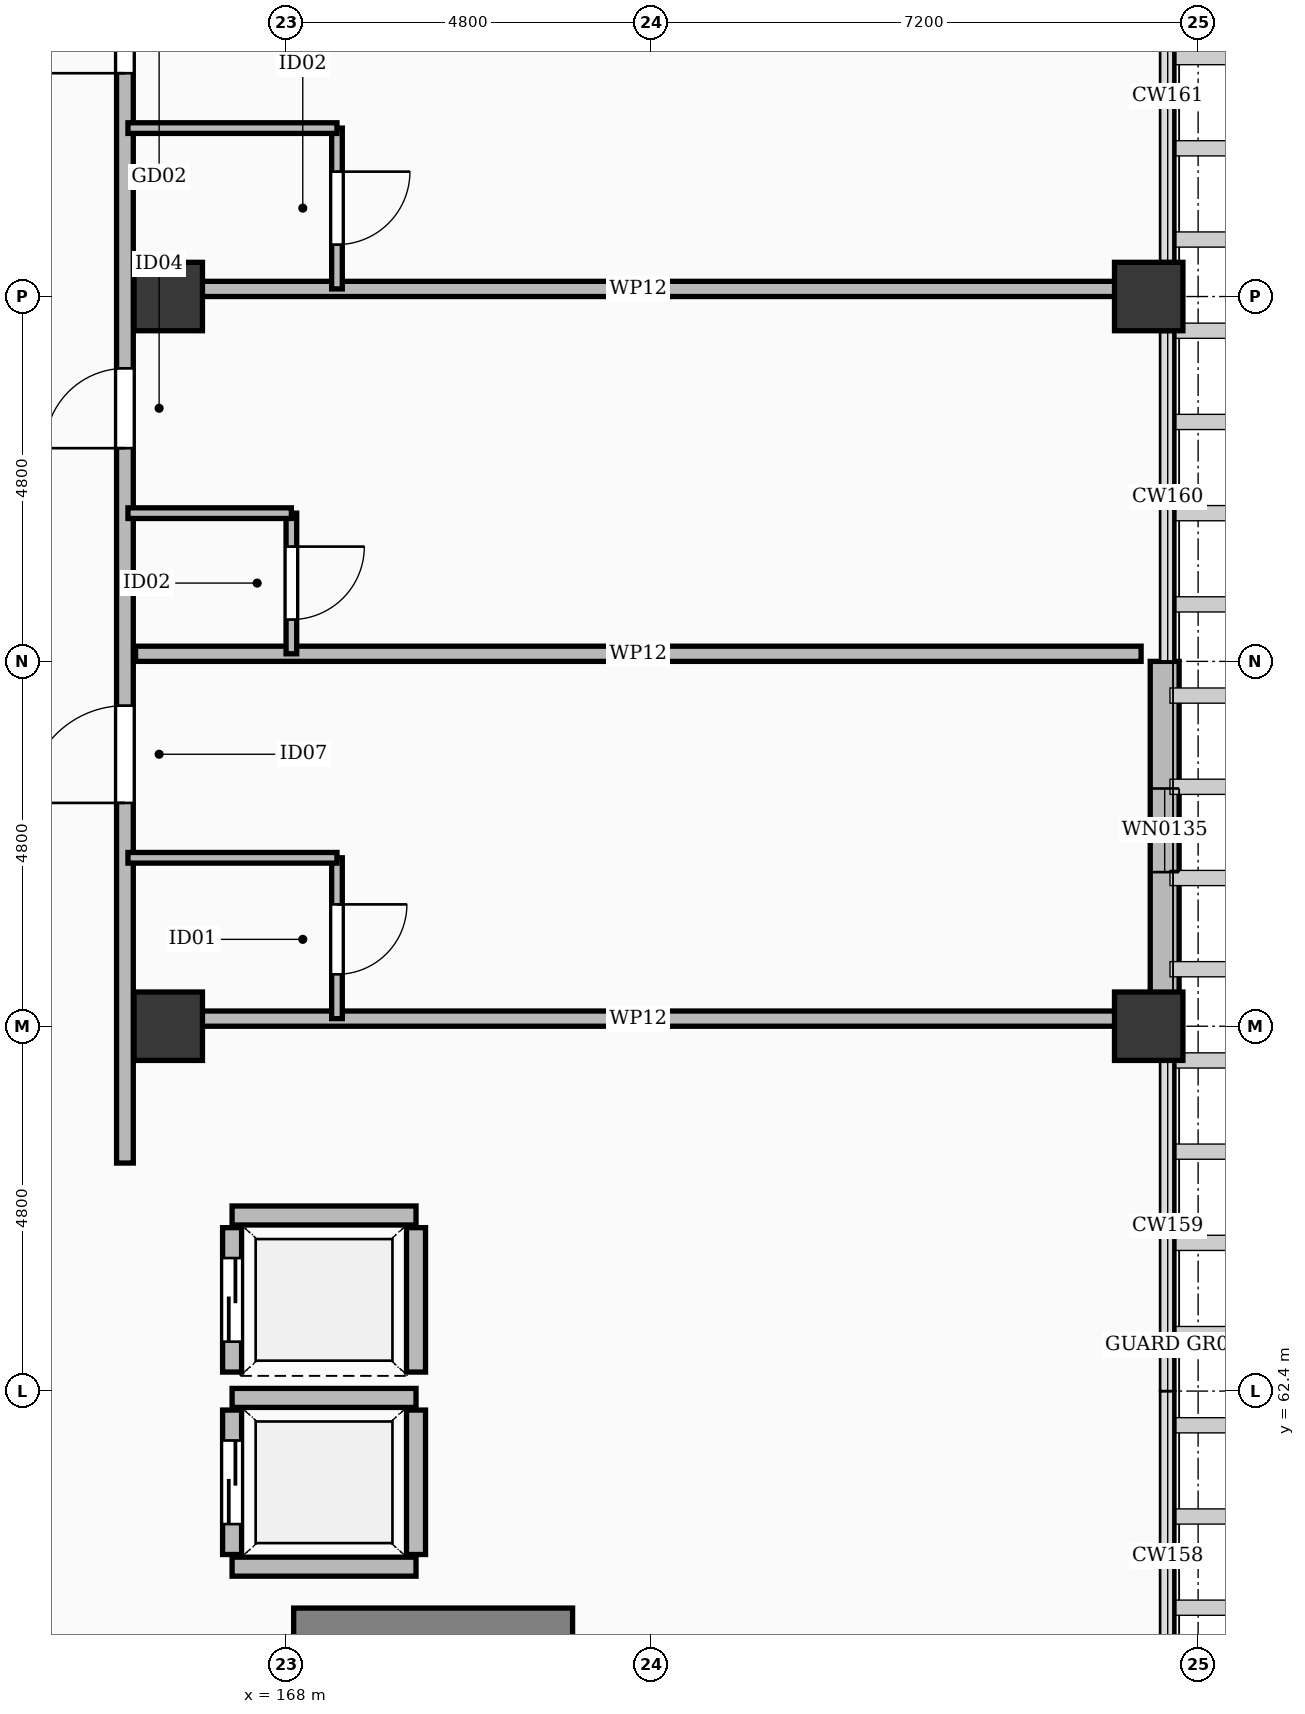
"""IFC4 building model, lengths in metres.
Left out: names, types, materials, properties, quantities, classifications, styles, units other than length and angle.
Written with IfcOpenShell. Run it as: python <this file> out.ifc"""

import sys

from ifc_helpers import new_model, si_unit, direction, frame, frame_2d, origin, origin_2d, place, context, subcontext, project, spatial, rectangle, extrude, element, fill, save


model = new_model("IFC4")
c1 = context("Model", 3, precision=1e-05, world=origin(), true_north=direction((0.0, 1.0)))
c2 = subcontext(c1, "Body", "Model", "MODEL_VIEW")
j1 = project(units=[si_unit("LENGTHUNIT", "METRE"), si_unit("PLANEANGLEUNIT", "RADIAN")], contexts=[c1])
p1 = place(None, origin())
s1 = spatial("IfcSite", under=j1, at=p1, CompositionType="ELEMENT")
p2 = place(p1, origin())
s2 = spatial("IfcBuilding", under=s1, at=p2, CompositionType="ELEMENT")
p3 = place(p2, frame((0.0, 0.0, 16.2)))
s3 = spatial("IfcBuildingStorey", under=s2, at=p3, CompositionType="ELEMENT", Elevation=16.2)
for number, where, z_axis, x_axis in (
    (1, (166.45, 67.2, 0.0), (0.0, 0.0, 1.0), (1.0, 0.0, 0.0)),
    (2, (166.45, 76.8, 0.0), (0.0, 0.0, 1.0), (1.0, 0.0, 0.0)),
    (3, (179.35, 67.2, 0.0), (0.0, 0.0, 1.0), (1.0, 0.0, 0.0)),
    (4, (179.35, 76.8, 0.0), (0.0, 0.0, 1.0), (1.0, 0.0, 0.0)),
):
    element("IfcColumn", number, at=place(p3, frame(where, z_axis=z_axis, x_axis=x_axis)), inside=s3, PredefinedType="COLUMN", context=c2, shape_type="SweptSolid", body=[
        extrude(rectangle(XDim=0.9, YDim=0.9, at=origin_2d()), origin(), (0.0, 0.0, 1.0), 4.8),
    ])
p4 = place(p3, frame((179.56, 72.0, 0.0), z_axis=(0.0, 0.0, 1.0), x_axis=(0.0, -1.0, 0.0)))
e5 = element("IfcWall", 5, at=p4, inside=s3, PredefinedType="SOLIDWALL", context=c2, shape_type="SweptSolid", body=[
    extrude(rectangle(XDim=4.375, YDim=0.38, at=frame_2d((2.188, 0.0))), origin(), (0.0, 0.0, 1.0), 3.032),
])
p5 = place(p4, frame((1.673, 0.0, 0.55)))
e6 = element("IfcOpeningElement", 6, at=p5, cuts=e5, PredefinedType="OPENING", context=c2, shape_type="SweptSolid", body=[
    extrude(rectangle(XDim=1.1, YDim=1.7, at=frame_2d((0.55, 0.85))), frame((0.0, 0.202, 0.0), z_axis=(0.0, -1.0, 0.0), x_axis=(1.0, 0.0, 0.0)), (0.0, 0.0, 1.0), 0.404),
])
p6 = place(p3, frame((168.1, 59.32, 0.0), z_axis=(0.0, 0.0, 1.0), x_axis=(1.0, 0.0, 0.0)))
e7 = element("IfcWall", 7, at=p6, inside=s3, PredefinedType="SHEAR", context=c2, shape_type="SweptSolid", body=[
    extrude(rectangle(XDim=3.67, YDim=0.45, at=frame_2d((1.835, 0.0))), origin(), (0.0, 0.0, 1.0), 4.54),
])
for number, where, z_axis, x_axis in (
    (8, (167.29, 60.09, 0.0), (0.0, 0.0, 1.0), (1.0, 0.0, 0.0)),
    (9, (167.29, 62.31, 0.0), (0.0, 0.0, 1.0), (1.0, 0.0, 0.0)),
):
    element("IfcWall", number, at=place(p3, frame(where, z_axis=z_axis, x_axis=x_axis)), inside=s3, PredefinedType="SOLIDWALL", context=c2, shape_type="SweptSolid", body=[
        extrude(rectangle(XDim=2.42, YDim=0.25, at=frame_2d((1.21, 0.0))), origin(), (0.0, 0.0, 1.0), 4.54),
    ])
p7 = place(p3, frame((167.29, 60.25, 0.0), z_axis=(0.0, 0.0, 1.0), x_axis=(0.0, 1.0, 0.0)))
e10 = element("IfcWall", 10, at=p7, inside=s3, PredefinedType="SOLIDWALL", context=c2, shape_type="SweptSolid", body=[
    extrude(rectangle(XDim=1.9, YDim=0.25, at=frame_2d((0.95, 0.0))), origin(), (0.0, 0.0, 1.0), 4.54),
])
p8 = place(p7, frame((0.4, 0.0, 0.0)))
e11 = element("IfcOpeningElement", 11, at=p8, cuts=e10, PredefinedType="OPENING", context=c2, shape_type="SweptSolid", body=[
    extrude(rectangle(XDim=1.1, YDim=2.2, at=frame_2d((0.55, 1.1))), frame((0.0, 0.137, 0.0), z_axis=(0.0, -1.0, 0.0), x_axis=(1.0, 0.0, 0.0)), (0.0, 0.0, 1.0), 0.274),
])
p9 = place(p3, frame((169.71, 60.25, 0.0), z_axis=(0.0, 0.0, 1.0), x_axis=(0.0, 1.0, 0.0)))
e12 = element("IfcWall", 12, at=p9, inside=s3, PredefinedType="SOLIDWALL", context=c2, shape_type="SweptSolid", body=[
    extrude(rectangle(XDim=1.9, YDim=0.25, at=frame_2d((0.95, 0.0))), origin(), (0.0, 0.0, 1.0), 4.54),
])
p10 = place(p3, frame((167.29, 64.71, 0.0), z_axis=(0.0, 0.0, 1.0), x_axis=(1.0, 0.0, 0.0)))
e13 = element("IfcWall", 13, at=p10, inside=s3, PredefinedType="SOLIDWALL", context=c2, shape_type="SweptSolid", body=[
    extrude(rectangle(XDim=2.42, YDim=0.25, at=frame_2d((1.21, 0.0))), origin(), (0.0, 0.0, 1.0), 4.54),
])
p11 = place(p3, frame((167.29, 62.65, 0.0), z_axis=(0.0, 0.0, 1.0), x_axis=(0.0, 1.0, 0.0)))
e14 = element("IfcWall", 14, at=p11, inside=s3, PredefinedType="SOLIDWALL", context=c2, shape_type="SweptSolid", body=[
    extrude(rectangle(XDim=1.9, YDim=0.25, at=frame_2d((0.95, 0.0))), origin(), (0.0, 0.0, 1.0), 4.54),
])
p12 = place(p11, frame((0.4, 0.0, 0.0)))
e15 = element("IfcOpeningElement", 15, at=p12, cuts=e14, PredefinedType="OPENING", context=c2, shape_type="SweptSolid", body=[
    extrude(rectangle(XDim=1.1, YDim=2.2, at=frame_2d((0.55, 1.1))), frame((0.0, 0.137, 0.0), z_axis=(0.0, -1.0, 0.0), x_axis=(1.0, 0.0, 0.0)), (0.0, 0.0, 1.0), 0.274),
])
p13 = place(p3, frame((169.71, 62.65, 0.0), z_axis=(0.0, 0.0, 1.0), x_axis=(0.0, 1.0, 0.0)))
e16 = element("IfcWall", 16, at=p13, inside=s3, PredefinedType="SOLIDWALL", context=c2, shape_type="SweptSolid", body=[
    extrude(rectangle(XDim=1.9, YDim=0.25, at=frame_2d((0.95, 0.0))), origin(), (0.0, 0.0, 1.0), 4.54),
])
p14 = place(p3, frame((165.88, 65.4, 0.0), z_axis=(0.0, 0.0, 1.0), x_axis=(0.0, 1.0, 0.0)))
e17 = element("IfcWall", 17, at=p14, inside=s3, PredefinedType="PARTITIONING", context=c2, shape_type="SweptSolid", body=[
    extrude(rectangle(XDim=60.25, YDim=0.22, at=frame_2d((30.125, 0.0))), origin(), (0.0, 0.0, 1.0), 3.732),
])
p15 = place(p14, frame((4.738, 0.0, 0.0)))
e18 = element("IfcOpeningElement", 18, at=p15, cuts=e17, PredefinedType="OPENING", context=c2, shape_type="SweptSolid", body=[
    extrude(rectangle(XDim=1.28, YDim=2.16, at=frame_2d((0.64, 1.08))), frame((0.0, 0.122, 0.0), z_axis=(0.0, -1.0, 0.0), x_axis=(1.0, 0.0, 0.0)), (0.0, 0.0, 1.0), 0.244),
])
p16 = place(p14, frame((9.405, 0.0, 0.0)))
e19 = element("IfcOpeningElement", 19, at=p16, cuts=e17, PredefinedType="OPENING", context=c2, shape_type="SweptSolid", body=[
    extrude(rectangle(XDim=1.05, YDim=2.18, at=frame_2d((0.525, 1.09))), frame((0.0, 0.122, 0.0), z_axis=(0.0, -1.0, 0.0), x_axis=(1.0, 0.0, 0.0)), (0.0, 0.0, 1.0), 0.244),
])
p17 = place(p14, frame((14.338, 0.0, 0.0)))
e20 = element("IfcOpeningElement", 20, at=p17, cuts=e17, PredefinedType="OPENING", context=c2, shape_type="SweptSolid", body=[
    extrude(rectangle(XDim=1.08, YDim=2.25, at=frame_2d((0.54, 1.125))), frame((0.0, 0.122, 0.0), z_axis=(0.0, -1.0, 0.0), x_axis=(1.0, 0.0, 0.0)), (0.0, 0.0, 1.0), 0.244),
])
p18 = place(p14, frame((19.005, 0.0, 0.0)))
e21 = element("IfcOpeningElement", 21, at=p18, cuts=e17, PredefinedType="OPENING", context=c2, shape_type="SweptSolid", body=[
    extrude(rectangle(XDim=1.02, YDim=2.2, at=frame_2d((0.51, 1.1))), frame((0.0, 0.122, 0.0), z_axis=(0.0, -1.0, 0.0), x_axis=(1.0, 0.0, 0.0)), (0.0, 0.0, 1.0), 0.244),
])
p19 = place(p14, frame((23.938, 0.0, 0.0)))
e22 = element("IfcOpeningElement", 22, at=p19, cuts=e17, PredefinedType="OPENING", context=c2, shape_type="SweptSolid", body=[
    extrude(rectangle(XDim=1.5, YDim=2.3, at=frame_2d((0.75, 1.15))), frame((0.0, 0.122, 0.0), z_axis=(0.0, -1.0, 0.0), x_axis=(1.0, 0.0, 0.0)), (0.0, 0.0, 1.0), 0.244),
])
p20 = place(p14, frame((28.605, 0.0, 0.0)))
e23 = element("IfcOpeningElement", 23, at=p20, cuts=e17, PredefinedType="OPENING", context=c2, shape_type="SweptSolid", body=[
    extrude(rectangle(XDim=1.12, YDim=2.15, at=frame_2d((0.56, 1.075))), frame((0.0, 0.122, 0.0), z_axis=(0.0, -1.0, 0.0), x_axis=(1.0, 0.0, 0.0)), (0.0, 0.0, 1.0), 0.244),
])
p21 = place(p14, frame((33.538, 0.0, 0.0)))
e24 = element("IfcOpeningElement", 24, at=p21, cuts=e17, PredefinedType="OPENING", context=c2, shape_type="SweptSolid", body=[
    extrude(rectangle(XDim=1.28, YDim=2.16, at=frame_2d((0.64, 1.08))), frame((0.0, 0.122, 0.0), z_axis=(0.0, -1.0, 0.0), x_axis=(1.0, 0.0, 0.0)), (0.0, 0.0, 1.0), 0.244),
])
p22 = place(p14, frame((38.205, 0.0, 0.0)))
e25 = element("IfcOpeningElement", 25, at=p22, cuts=e17, PredefinedType="OPENING", context=c2, shape_type="SweptSolid", body=[
    extrude(rectangle(XDim=1.05, YDim=2.18, at=frame_2d((0.525, 1.09))), frame((0.0, 0.122, 0.0), z_axis=(0.0, -1.0, 0.0), x_axis=(1.0, 0.0, 0.0)), (0.0, 0.0, 1.0), 0.244),
])
p23 = place(p14, frame((43.138, 0.0, 0.0)))
e26 = element("IfcOpeningElement", 26, at=p23, cuts=e17, PredefinedType="OPENING", context=c2, shape_type="SweptSolid", body=[
    extrude(rectangle(XDim=1.08, YDim=2.25, at=frame_2d((0.54, 1.125))), frame((0.0, 0.122, 0.0), z_axis=(0.0, -1.0, 0.0), x_axis=(1.0, 0.0, 0.0)), (0.0, 0.0, 1.0), 0.244),
])
p24 = place(p14, frame((47.805, 0.0, 0.0)))
e27 = element("IfcOpeningElement", 27, at=p24, cuts=e17, PredefinedType="OPENING", context=c2, shape_type="SweptSolid", body=[
    extrude(rectangle(XDim=1.02, YDim=2.2, at=frame_2d((0.51, 1.1))), frame((0.0, 0.122, 0.0), z_axis=(0.0, -1.0, 0.0), x_axis=(1.0, 0.0, 0.0)), (0.0, 0.0, 1.0), 0.244),
])
p25 = place(p14, frame((52.738, 0.0, 0.0)))
e28 = element("IfcOpeningElement", 28, at=p25, cuts=e17, PredefinedType="OPENING", context=c2, shape_type="SweptSolid", body=[
    extrude(rectangle(XDim=1.5, YDim=2.3, at=frame_2d((0.75, 1.15))), frame((0.0, 0.122, 0.0), z_axis=(0.0, -1.0, 0.0), x_axis=(1.0, 0.0, 0.0)), (0.0, 0.0, 1.0), 0.244),
])
p26 = place(p14, frame((57.405, 0.0, 0.0)))
e29 = element("IfcOpeningElement", 29, at=p26, cuts=e17, PredefinedType="OPENING", context=c2, shape_type="SweptSolid", body=[
    extrude(rectangle(XDim=1.12, YDim=2.15, at=frame_2d((0.56, 1.075))), frame((0.0, 0.122, 0.0), z_axis=(0.0, -1.0, 0.0), x_axis=(1.0, 0.0, 0.0)), (0.0, 0.0, 1.0), 0.244),
])
p27 = place(p3, frame((166.02, 67.3, 0.0), z_axis=(0.0, 0.0, 1.0), x_axis=(1.0, 0.0, 0.0)))
e30 = element("IfcWall", 30, at=p27, inside=s3, PredefinedType="PARTITIONING", context=c2, shape_type="SweptSolid", body=[
    extrude(rectangle(XDim=13.23, YDim=0.2, at=frame_2d((6.615, 0.0))), origin(), (0.0, 0.0, 1.0), 3.032),
])
p28 = place(p3, frame((168.67, 67.3, 0.0), z_axis=(0.0, 0.0, 1.0), x_axis=(0.0, 1.0, 0.0)))
e31 = element("IfcWall", 31, at=p28, inside=s3, PredefinedType="PARTITIONING", context=c2, shape_type="SweptSolid", body=[
    extrude(rectangle(XDim=2.116, YDim=0.14, at=frame_2d((1.058, 0.0))), origin(), (0.0, 0.0, 1.0), 3.732),
])
p29 = place(p28, frame((0.583, 0.0, 0.0)))
e32 = element("IfcOpeningElement", 32, at=p29, cuts=e31, PredefinedType="OPENING", context=c2, shape_type="SweptSolid", body=[
    extrude(rectangle(XDim=0.92, YDim=2.1, at=frame_2d((0.46, 1.05))), frame((0.0, 0.082, 0.0), z_axis=(0.0, -1.0, 0.0), x_axis=(1.0, 0.0, 0.0)), (0.0, 0.0, 1.0), 0.164),
])
p30 = place(p3, frame((165.92, 69.416, 0.0), z_axis=(0.0, 0.0, 1.0), x_axis=(1.0, 0.0, 0.0)))
e33 = element("IfcWall", 33, at=p30, inside=s3, PredefinedType="PARTITIONING", context=c2, shape_type="SweptSolid", body=[
    extrude(rectangle(XDim=2.75, YDim=0.14, at=frame_2d((1.375, 0.0))), origin(), (0.0, 0.0, 1.0), 3.132),
])
p31 = place(p3, frame((166.02, 72.1, 0.0), z_axis=(0.0, 0.0, 1.0), x_axis=(1.0, 0.0, 0.0)))
e34 = element("IfcWall", 34, at=p31, inside=s3, PredefinedType="PARTITIONING", context=c2, shape_type="SweptSolid", body=[
    extrude(rectangle(XDim=13.23, YDim=0.2, at=frame_2d((6.615, 0.0))), origin(), (0.0, 0.0, 1.0), 3.032),
])
p32 = place(p3, frame((168.07, 72.1, 0.0), z_axis=(0.0, 0.0, 1.0), x_axis=(0.0, 1.0, 0.0)))
e35 = element("IfcWall", 35, at=p32, inside=s3, PredefinedType="PARTITIONING", context=c2, shape_type="SweptSolid", body=[
    extrude(rectangle(XDim=1.85, YDim=0.14, at=frame_2d((0.925, 0.0))), origin(), (0.0, 0.0, 1.0), 4.54),
])
p33 = place(p32, frame((0.45, 0.0, 0.0)))
e36 = element("IfcOpeningElement", 36, at=p33, cuts=e35, PredefinedType="OPENING", context=c2, shape_type="SweptSolid", body=[
    extrude(rectangle(XDim=0.96, YDim=2.12, at=frame_2d((0.48, 1.06))), frame((0.0, 0.082, 0.0), z_axis=(0.0, -1.0, 0.0), x_axis=(1.0, 0.0, 0.0)), (0.0, 0.0, 1.0), 0.164),
])
p34 = place(p3, frame((165.92, 73.95, 0.0), z_axis=(0.0, 0.0, 1.0), x_axis=(1.0, 0.0, 0.0)))
e37 = element("IfcWall", 37, at=p34, inside=s3, PredefinedType="PARTITIONING", context=c2, shape_type="SweptSolid", body=[
    extrude(rectangle(XDim=2.15, YDim=0.14, at=frame_2d((1.075, 0.0))), origin(), (0.0, 0.0, 1.0), 3.132),
])
p35 = place(p3, frame((166.02, 76.9, 0.0), z_axis=(0.0, 0.0, 1.0), x_axis=(1.0, 0.0, 0.0)))
e38 = element("IfcWall", 38, at=p35, inside=s3, PredefinedType="PARTITIONING", context=c2, shape_type="SweptSolid", body=[
    extrude(rectangle(XDim=13.23, YDim=0.2, at=frame_2d((6.615, 0.0))), origin(), (0.0, 0.0, 1.0), 3.032),
])
p36 = place(p3, frame((168.67, 76.9, 0.0), z_axis=(0.0, 0.0, 1.0), x_axis=(0.0, 1.0, 0.0)))
e39 = element("IfcWall", 39, at=p36, inside=s3, PredefinedType="PARTITIONING", context=c2, shape_type="SweptSolid", body=[
    extrude(rectangle(XDim=2.116, YDim=0.14, at=frame_2d((1.058, 0.0))), origin(), (0.0, 0.0, 1.0), 3.732),
])
p37 = place(p36, frame((0.583, 0.0, 0.0)))
e40 = element("IfcOpeningElement", 40, at=p37, cuts=e39, PredefinedType="OPENING", context=c2, shape_type="SweptSolid", body=[
    extrude(rectangle(XDim=0.96, YDim=2.12, at=frame_2d((0.48, 1.06))), frame((0.0, 0.082, 0.0), z_axis=(0.0, -1.0, 0.0), x_axis=(1.0, 0.0, 0.0)), (0.0, 0.0, 1.0), 0.164),
])
p38 = place(p3, frame((165.92, 79.016, 0.0), z_axis=(0.0, 0.0, 1.0), x_axis=(1.0, 0.0, 0.0)))
e41 = element("IfcWall", 41, at=p38, inside=s3, PredefinedType="PARTITIONING", context=c2, shape_type="SweptSolid", body=[
    extrude(rectangle(XDim=2.75, YDim=0.14, at=frame_2d((1.375, 0.0))), origin(), (0.0, 0.0, 1.0), 3.132),
])
p39 = place(p5, origin())
e42 = element("IfcWindow", 42, at=p39, inside=s3, PartitioningType="SINGLE_PANEL", PredefinedType="WINDOW", context=c2, shape_type="SweptSolid", body=[
    extrude(rectangle(XDim=1.1, YDim=1.7, at=frame_2d((0.55, 0.85))), frame((0.0, 0.03, 0.0), z_axis=(0.0, -1.0, 0.0), x_axis=(1.0, 0.0, 0.0)), (0.0, 0.0, 1.0), 0.06),
])
fill(e6, e42)
p40 = place(p8, origin())
e43 = element("IfcDoor", 43, at=p40, inside=s3, OperationType="SLIDING_TO_LEFT", PredefinedType="DOOR", context=c2, shape_type="SweptSolid", body=[
    extrude(rectangle(XDim=1.1, YDim=2.2, at=frame_2d((0.55, 1.1))), frame((0.0, 0.025, 0.0), z_axis=(0.0, -1.0, 0.0), x_axis=(1.0, 0.0, 0.0)), (0.0, 0.0, 1.0), 0.05),
])
fill(e11, e43)
p41 = place(p12, origin())
e44 = element("IfcDoor", 44, at=p41, inside=s3, OperationType="SLIDING_TO_LEFT", PredefinedType="DOOR", context=c2, shape_type="SweptSolid", body=[
    extrude(rectangle(XDim=1.1, YDim=2.2, at=frame_2d((0.55, 1.1))), frame((0.0, 0.025, 0.0), z_axis=(0.0, -1.0, 0.0), x_axis=(1.0, 0.0, 0.0)), (0.0, 0.0, 1.0), 0.05),
])
fill(e15, e44)
p42 = place(p15, origin())
e45 = element("IfcDoor", 45, at=p42, inside=s3, OperationType="SINGLE_SWING_LEFT", PredefinedType="DOOR", context=c2, shape_type="SweptSolid", body=[
    extrude(rectangle(XDim=1.28, YDim=2.16, at=frame_2d((0.64, 1.08))), frame((0.0, 0.025, 0.0), z_axis=(0.0, -1.0, 0.0), x_axis=(1.0, 0.0, 0.0)), (0.0, 0.0, 1.0), 0.05),
])
fill(e18, e45)
p43 = place(p29, frame((0.92, 0.0, 0.0), z_axis=(0.0, 0.0, 1.0), x_axis=(-1.0, 0.0, 0.0)))
e46 = element("IfcDoor", 46, at=p43, inside=s3, OperationType="SINGLE_SWING_RIGHT", PredefinedType="DOOR", context=c2, shape_type="SweptSolid", body=[
    extrude(rectangle(XDim=0.92, YDim=2.1, at=frame_2d((0.46, 1.05))), frame((0.0, 0.025, 0.0), z_axis=(0.0, -1.0, 0.0), x_axis=(1.0, 0.0, 0.0)), (0.0, 0.0, 1.0), 0.05),
])
fill(e32, e46)
p44 = place(p16, origin())
e47 = element("IfcDoor", 47, at=p44, inside=s3, OperationType="SINGLE_SWING_LEFT", PredefinedType="DOOR", context=c2, shape_type="SweptSolid", body=[
    extrude(rectangle(XDim=1.05, YDim=2.18, at=frame_2d((0.525, 1.09))), frame((0.0, 0.025, 0.0), z_axis=(0.0, -1.0, 0.0), x_axis=(1.0, 0.0, 0.0)), (0.0, 0.0, 1.0), 0.05),
])
fill(e19, e47)
p45 = place(p33, frame((0.96, 0.0, 0.0), z_axis=(0.0, 0.0, 1.0), x_axis=(-1.0, 0.0, 0.0)))
e48 = element("IfcDoor", 48, at=p45, inside=s3, OperationType="SINGLE_SWING_RIGHT", PredefinedType="DOOR", context=c2, shape_type="SweptSolid", body=[
    extrude(rectangle(XDim=0.96, YDim=2.12, at=frame_2d((0.48, 1.06))), frame((0.0, 0.025, 0.0), z_axis=(0.0, -1.0, 0.0), x_axis=(1.0, 0.0, 0.0)), (0.0, 0.0, 1.0), 0.05),
])
fill(e36, e48)
p46 = place(p17, origin())
e49 = element("IfcDoor", 49, at=p46, inside=s3, OperationType="SINGLE_SWING_LEFT", PredefinedType="DOOR", context=c2, shape_type="SweptSolid", body=[
    extrude(rectangle(XDim=1.08, YDim=2.25, at=frame_2d((0.54, 1.125))), frame((0.0, 0.025, 0.0), z_axis=(0.0, -1.0, 0.0), x_axis=(1.0, 0.0, 0.0)), (0.0, 0.0, 1.0), 0.05),
])
fill(e20, e49)
p47 = place(p37, frame((0.96, 0.0, 0.0), z_axis=(0.0, 0.0, 1.0), x_axis=(-1.0, 0.0, 0.0)))
e50 = element("IfcDoor", 50, at=p47, inside=s3, OperationType="SINGLE_SWING_RIGHT", PredefinedType="DOOR", context=c2, shape_type="SweptSolid", body=[
    extrude(rectangle(XDim=0.96, YDim=2.12, at=frame_2d((0.48, 1.06))), frame((0.0, 0.025, 0.0), z_axis=(0.0, -1.0, 0.0), x_axis=(1.0, 0.0, 0.0)), (0.0, 0.0, 1.0), 0.05),
])
fill(e40, e50)
save(model, sys.argv[1])
